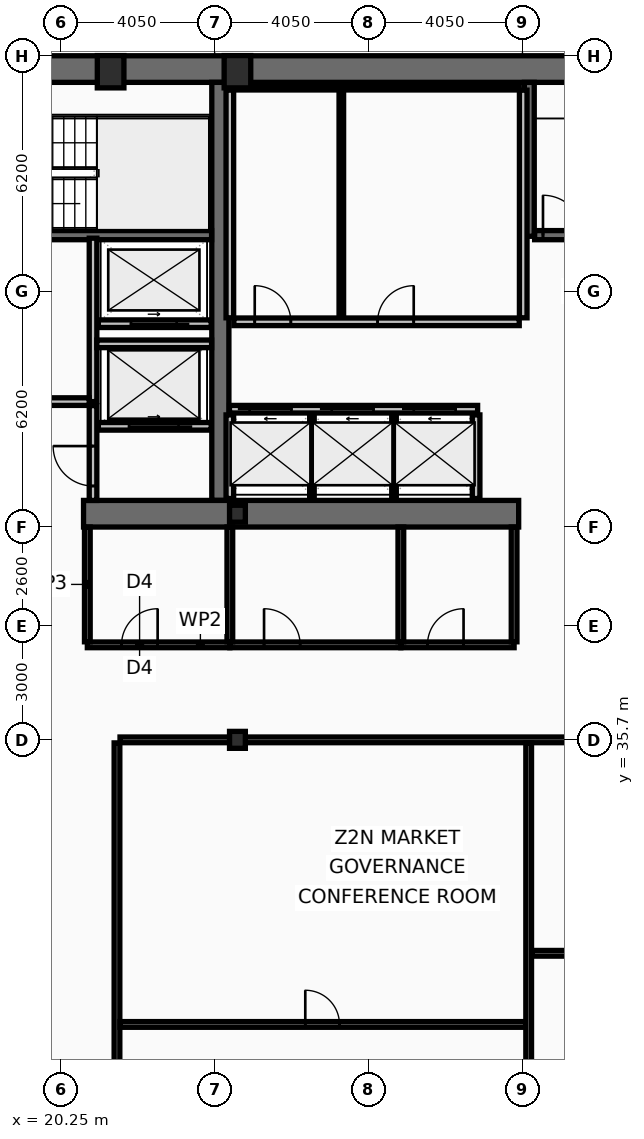
"""IFC4 building model, lengths in metres.
Left out: names, types, materials, properties, quantities, classifications, styles, units other than length and angle.
Written with IfcOpenShell. Run it as: python <this file> out.ifc"""

import sys

from ifc_helpers import new_model, si_unit, direction, frame, frame_2d, origin, origin_2d, place, context, subcontext, project, spatial, rectangle, hollow_rectangle, i_section, extrude, element, fill, save


model = new_model("IFC4")
c1 = context("Model", 3, precision=1e-05, world=origin(), true_north=direction((0.0, 1.0)))
c2 = subcontext(c1, "Body", "Model", "MODEL_VIEW")
j1 = project(units=[si_unit("LENGTHUNIT", "METRE"), si_unit("PLANEANGLEUNIT", "RADIAN")], contexts=[c1])
p1 = place(None, origin())
s1 = spatial("IfcSite", under=j1, at=p1, CompositionType="ELEMENT")
p2 = place(p1, origin())
s2 = spatial("IfcBuilding", under=s1, at=p2, CompositionType="ELEMENT")
p3 = place(p2, frame((0.0, 0.0, 161.4)))
s3 = spatial("IfcBuildingStorey", under=s2, at=p3, CompositionType="ELEMENT", Elevation=161.4)
p4 = place(p3, frame((16.2, 53.35, 0.0), z_axis=(0.0, 0.0, 1.0), x_axis=(1.0, 0.0, 0.0)))
e1 = element("IfcWall", 1, at=p4, inside=s3, PredefinedType="SHEAR", context=c2, shape_type="SweptSolid", body=[
    extrude(rectangle(XDim=40.5, YDim=0.7, at=frame_2d((20.25, 0.0))), origin(), (0.0, 0.0, 1.0), 3.44),
])
p5 = place(p3, frame((24.45, 42.0, 0.0), z_axis=(0.0, 0.0, 1.0), x_axis=(0.0, 1.0, 0.0)))
e2 = element("IfcWall", 2, at=p5, inside=s3, PredefinedType="SHEAR", context=c2, shape_type="SweptSolid", body=[
    extrude(rectangle(XDim=11.0, YDim=0.45, at=frame_2d((5.5, 0.0))), origin(), (0.0, 0.0, 1.0), 3.44),
])
p6 = place(p3, frame((32.3, 41.65, 0.0), z_axis=(0.0, 0.0, 1.0), x_axis=(-1.0, 0.0, 0.0)))
e3 = element("IfcWall", 3, at=p6, inside=s3, PredefinedType="SHEAR", context=c2, shape_type="SweptSolid", body=[
    extrude(rectangle(XDim=11.45, YDim=0.7, at=frame_2d((5.725, 0.0))), origin(), (0.0, 0.0, 1.0), 3.44),
])
p7 = place(p3, frame((32.58, 48.95, 0.0), z_axis=(0.0, 0.0, 1.0), x_axis=(0.0, 1.0, 0.0)))
e4 = element("IfcWall", 4, at=p7, inside=s3, PredefinedType="SHEAR", context=c2, shape_type="SweptSolid", body=[
    extrude(rectangle(XDim=4.05, YDim=0.26, at=frame_2d((2.025, 0.0))), origin(), (0.0, 0.0, 1.0), 3.44),
])
p8 = place(p3, frame((16.9, 48.98, 0.0), z_axis=(0.0, 0.0, 1.0), x_axis=(1.0, 0.0, 0.0)))
e5 = element("IfcWall", 5, at=p8, inside=s3, PredefinedType="SHEAR", context=c2, shape_type="SweptSolid", body=[
    extrude(rectangle(XDim=7.32, YDim=0.24, at=frame_2d((3.66, 0.0))), origin(), (0.0, 0.0, 1.0), 3.44),
])
p9 = place(p8, frame((0.22, 0.0, 0.0)))
e6 = element("IfcOpeningElement", 6, at=p9, cuts=e5, PredefinedType="OPENING", context=c2, shape_type="SweptSolid", body=[
    extrude(rectangle(XDim=1.05, YDim=2.15, at=frame_2d((0.525, 1.075))), frame((0.0, 0.13, 0.0), z_axis=(0.0, -1.0, 0.0), x_axis=(1.0, 0.0, 0.0)), (0.0, 0.0, 1.0), 0.26),
])
p10 = place(p3, frame((32.72, 48.98, 0.0), z_axis=(0.0, 0.0, 1.0), x_axis=(1.0, 0.0, 0.0)))
e7 = element("IfcWall", 7, at=p10, inside=s3, PredefinedType="SHEAR", context=c2, shape_type="SweptSolid", body=[
    extrude(rectangle(XDim=7.56, YDim=0.24, at=frame_2d((3.78, 0.0))), origin(), (0.0, 0.0, 1.0), 3.44),
])
p11 = place(p10, frame((0.22, 0.0, 0.0)))
e8 = element("IfcOpeningElement", 8, at=p11, cuts=e7, PredefinedType="OPENING", context=c2, shape_type="SweptSolid", body=[
    extrude(rectangle(XDim=1.05, YDim=2.15, at=frame_2d((0.525, 1.075))), frame((0.0, 0.13, 0.0), z_axis=(0.0, -1.0, 0.0), x_axis=(1.0, 0.0, 0.0)), (0.0, 0.0, 1.0), 0.26),
])
for number, where, z_axis, x_axis in (
    (9, (21.562, 53.28, 0.0), (0.0, 0.0, 1.0), (1.0, 0.0, 0.0)),
    (10, (24.9, 53.28, 0.0), (0.0, 0.0, 1.0), (1.0, 0.0, 0.0)),
):
    element("IfcColumn", number, at=place(p3, frame(where, z_axis=z_axis, x_axis=x_axis)), inside=s3, PredefinedType="COLUMN", context=c2, shape_type="SweptSolid", body=[
        extrude(hollow_rectangle(XDim=0.7, YDim=0.85, WallThickness=0.05, at=origin_2d()), origin(), (0.0, 0.0, 1.0), 3.6),
    ])
for number, where, z_axis, x_axis in (
    (11, (24.9, 35.7, 0.0), (0.0, 0.0, 1.0), (1.0, 0.0, 0.0)),
    (12, (24.9, 41.65, 0.0), (0.0, 0.0, 1.0), (1.0, 0.0, 0.0)),
):
    element("IfcColumn", number, at=place(p3, frame(where, z_axis=z_axis, x_axis=x_axis)), inside=s3, PredefinedType="COLUMN", context=c2, shape_type="SweptSolid", body=[
        extrude(i_section(OverallWidth=0.416, OverallDepth=0.446, WebThickness=0.039, FlangeThickness=0.063, at=origin_2d()), origin(), (0.0, 0.0, 1.0), 3.6),
    ])
p12 = place(p3, frame((24.69, 44.4, 0.0), z_axis=(0.0, 0.0, 1.0), x_axis=(1.0, 0.0, 0.0)))
e13 = element("IfcWall", 13, at=p12, inside=s3, PredefinedType="PARTITIONING", context=c2, shape_type="SweptSolid", body=[
    extrude(rectangle(XDim=6.53, YDim=0.2, at=frame_2d((3.265, 0.0))), origin(), (0.0, 0.0, 1.0), 3.44),
])
p13 = place(p12, frame((0.53, 0.0, 0.0)))
e14 = element("IfcOpeningElement", 14, at=p13, cuts=e13, PredefinedType="OPENING", context=c2, shape_type="SweptSolid", body=[
    extrude(rectangle(XDim=1.1, YDim=2.18, at=frame_2d((0.55, 1.09))), frame((0.0, 0.11, 0.0), z_axis=(0.0, -1.0, 0.0), x_axis=(1.0, 0.0, 0.0)), (0.0, 0.0, 1.0), 0.22),
])
p14 = place(p12, frame((2.69, 0.0, 0.0)))
e15 = element("IfcOpeningElement", 15, at=p14, cuts=e13, PredefinedType="OPENING", context=c2, shape_type="SweptSolid", body=[
    extrude(rectangle(XDim=1.1, YDim=2.18, at=frame_2d((0.55, 1.09))), frame((0.0, 0.11, 0.0), z_axis=(0.0, -1.0, 0.0), x_axis=(1.0, 0.0, 0.0)), (0.0, 0.0, 1.0), 0.22),
])
p15 = place(p12, frame((4.85, 0.0, 0.0)))
e16 = element("IfcOpeningElement", 16, at=p15, cuts=e13, PredefinedType="OPENING", context=c2, shape_type="SweptSolid", body=[
    extrude(rectangle(XDim=1.1, YDim=2.18, at=frame_2d((0.55, 1.09))), frame((0.0, 0.11, 0.0), z_axis=(0.0, -1.0, 0.0), x_axis=(1.0, 0.0, 0.0)), (0.0, 0.0, 1.0), 0.22),
])
p16 = place(p3, frame((24.21, 43.95, 0.0), z_axis=(0.0, 0.0, 1.0), x_axis=(-1.0, 0.0, 0.0)))
e17 = element("IfcWall", 17, at=p16, inside=s3, PredefinedType="PARTITIONING", context=c2, shape_type="SweptSolid", body=[
    extrude(rectangle(XDim=2.97, YDim=0.2, at=frame_2d((1.485, 0.0))), origin(), (0.0, 0.0, 1.0), 3.44),
])
p17 = place(p16, frame((0.86, 0.0, 0.0)))
e18 = element("IfcOpeningElement", 18, at=p17, cuts=e17, PredefinedType="OPENING", context=c2, shape_type="SweptSolid", body=[
    extrude(rectangle(XDim=1.3, YDim=2.18, at=frame_2d((0.65, 1.09))), frame((0.0, 0.11, 0.0), z_axis=(0.0, -1.0, 0.0), x_axis=(1.0, 0.0, 0.0)), (0.0, 0.0, 1.0), 0.22),
])
p18 = place(p3, frame((24.21, 46.65, 0.0), z_axis=(0.0, 0.0, 1.0), x_axis=(-1.0, 0.0, 0.0)))
e19 = element("IfcWall", 19, at=p18, inside=s3, PredefinedType="PARTITIONING", context=c2, shape_type="SweptSolid", body=[
    extrude(rectangle(XDim=2.97, YDim=0.2, at=frame_2d((1.485, 0.0))), origin(), (0.0, 0.0, 1.0), 3.44),
])
p19 = place(p18, frame((0.91, 0.0, 0.0)))
e20 = element("IfcOpeningElement", 20, at=p19, cuts=e19, PredefinedType="OPENING", context=c2, shape_type="SweptSolid", body=[
    extrude(rectangle(XDim=1.2, YDim=2.18, at=frame_2d((0.6, 1.09))), frame((0.0, 0.11, 0.0), z_axis=(0.0, -1.0, 0.0), x_axis=(1.0, 0.0, 0.0)), (0.0, 0.0, 1.0), 0.22),
])
p20 = place(p3, frame((21.1, 44.6, 0.0), z_axis=(0.0, 0.0, 1.0), x_axis=(0.0, 1.0, 0.0)))
e21 = element("IfcWall", 21, at=p20, inside=s3, PredefinedType="PARTITIONING", context=c2, shape_type="SweptSolid", body=[
    extrude(rectangle(XDim=4.3, YDim=0.2, at=frame_2d((2.15, 0.0))), origin(), (0.0, 0.0, 1.0), 3.44),
])
p21 = place(p3, frame((16.9, 44.6, 0.0), z_axis=(0.0, 0.0, 1.0), x_axis=(1.0, 0.0, 0.0)))
e22 = element("IfcWall", 22, at=p21, inside=s3, PredefinedType="PARTITIONING", context=c2, shape_type="SweptSolid", body=[
    extrude(rectangle(XDim=4.1, YDim=0.2, at=frame_2d((2.05, 0.0))), origin(), (0.0, 0.0, 1.0), 3.44),
])
p22 = place(p21, frame((1.25, 0.0, 0.0)))
e23 = element("IfcOpeningElement", 23, at=p22, cuts=e22, PredefinedType="OPENING", context=c2, shape_type="SweptSolid", body=[
    extrude(rectangle(XDim=1.05, YDim=2.15, at=frame_2d((0.525, 1.075))), frame((0.0, 0.11, 0.0), z_axis=(0.0, -1.0, 0.0), x_axis=(1.0, 0.0, 0.0)), (0.0, 0.0, 1.0), 0.22),
])
p23 = place(p3, frame((21.2, 46.12, 0.0), z_axis=(0.0, 0.0, 1.0), x_axis=(1.0, 0.0, 0.0)))
e24 = element("IfcWall", 24, at=p23, inside=s3, PredefinedType="PARTITIONING", context=c2, shape_type="SweptSolid", body=[
    extrude(rectangle(XDim=3.02, YDim=0.2, at=frame_2d((1.51, 0.0))), origin(), (0.0, 0.0, 1.0), 3.44),
])
p24 = place(p3, frame((21.1, 42.0, 0.0), z_axis=(0.0, 0.0, 1.0), x_axis=(0.0, 1.0, 0.0)))
e25 = element("IfcWall", 25, at=p24, inside=s3, PredefinedType="PARTITIONING", context=c2, shape_type="SweptSolid", body=[
    extrude(rectangle(XDim=2.495, YDim=0.2, at=frame_2d((1.248, 0.0))), origin(), (0.0, 0.0, 1.0), 3.44),
])
p25 = place(p24, frame((0.38, 0.0, 0.0)))
e26 = element("IfcOpeningElement", 26, at=p25, cuts=e25, PredefinedType="OPENING", context=c2, shape_type="SweptSolid", body=[
    extrude(rectangle(XDim=1.05, YDim=2.15, at=frame_2d((0.525, 1.075))), frame((0.0, 0.11, 0.0), z_axis=(0.0, -1.0, 0.0), x_axis=(1.0, 0.0, 0.0)), (0.0, 0.0, 1.0), 0.22),
])
for number, where, z_axis, x_axis in (
    (27, (24.7, 46.805, 0.0), (0.0, 0.0, 1.0), (0.0, 1.0, 0.0)),
    (28, (32.42, 46.805, 0.0), (0.0, 0.0, 1.0), (0.0, 1.0, 0.0)),
):
    element("IfcWall", number, at=place(p3, frame(where, z_axis=z_axis, x_axis=x_axis)), inside=s3, PredefinedType="PARTITIONING", context=c2, shape_type="SweptSolid", body=[
        extrude(rectangle(XDim=5.99, YDim=0.2, at=frame_2d((2.995, 0.0))), origin(), (0.0, 0.0, 1.0), 3.44),
    ])
p26 = place(p3, frame((24.805, 52.86, 0.0), z_axis=(0.0, 0.0, 1.0), x_axis=(1.0, 0.0, 0.0)))
e29 = element("IfcWall", 29, at=p26, inside=s3, PredefinedType="PARTITIONING", context=c2, shape_type="SweptSolid", body=[
    extrude(rectangle(XDim=7.51, YDim=0.12, at=frame_2d((3.755, 0.0))), origin(), (0.0, 0.0, 1.0), 3.44),
])
p27 = place(p3, frame((27.634, 46.805, 0.0), z_axis=(0.0, 0.0, 1.0), x_axis=(0.0, 1.0, 0.0)))
e30 = element("IfcWall", 30, at=p27, inside=s3, PredefinedType="PARTITIONING", context=c2, shape_type="SweptSolid", body=[
    extrude(rectangle(XDim=5.99, YDim=0.12, at=frame_2d((2.995, 0.0))), origin(), (0.0, 0.0, 1.0), 3.44),
])
p28 = place(p3, frame((24.805, 46.7, 0.0), z_axis=(0.0, 0.0, 1.0), x_axis=(1.0, 0.0, 0.0)))
e31 = element("IfcWall", 31, at=p28, inside=s3, PredefinedType="PARTITIONING", context=c2, shape_type="SweptSolid", body=[
    extrude(rectangle(XDim=7.51, YDim=0.2, at=frame_2d((3.755, 0.0))), origin(), (0.0, 0.0, 1.0), 3.44),
])
p29 = place(p28, frame((0.55, 0.0, 0.0)))
e32 = element("IfcOpeningElement", 32, at=p29, cuts=e31, PredefinedType="OPENING", context=c2, shape_type="SweptSolid", body=[
    extrude(rectangle(XDim=0.95, YDim=2.1, at=frame_2d((0.475, 1.05))), frame((0.0, 0.11, 0.0), z_axis=(0.0, -1.0, 0.0), x_axis=(1.0, 0.0, 0.0)), (0.0, 0.0, 1.0), 0.22),
])
p30 = place(p28, frame((3.784, 0.0, 0.0)))
e33 = element("IfcOpeningElement", 33, at=p30, cuts=e31, PredefinedType="OPENING", context=c2, shape_type="SweptSolid", body=[
    extrude(rectangle(XDim=0.95, YDim=2.1, at=frame_2d((0.475, 1.05))), frame((0.0, 0.11, 0.0), z_axis=(0.0, -1.0, 0.0), x_axis=(1.0, 0.0, 0.0)), (0.0, 0.0, 1.0), 0.22),
])
for number, where, z_axis, x_axis in (
    (34, (24.7, 42.05, 0.0), (0.0, 0.0, 1.0), (0.0, 1.0, 0.0)),
    (35, (31.18, 42.05, 0.0), (0.0, 0.0, 1.0), (0.0, 1.0, 0.0)),
):
    element("IfcWall", number, at=place(p3, frame(where, z_axis=z_axis, x_axis=x_axis)), inside=s3, PredefinedType="PARTITIONING", context=c2, shape_type="SweptSolid", body=[
        extrude(rectangle(XDim=2.2, YDim=0.2, at=frame_2d((1.1, 0.0))), origin(), (0.0, 0.0, 1.0), 3.44),
    ])
for number, where, z_axis, x_axis in (
    (36, (26.86, 42.05, 0.0), (0.0, 0.0, 1.0), (0.0, 1.0, 0.0)),
    (37, (29.02, 42.05, 0.0), (0.0, 0.0, 1.0), (0.0, 1.0, 0.0)),
):
    element("IfcWall", number, at=place(p3, frame(where, z_axis=z_axis, x_axis=x_axis)), inside=s3, PredefinedType="PARTITIONING", context=c2, shape_type="SweptSolid", body=[
        extrude(rectangle(XDim=2.2, YDim=0.12, at=frame_2d((1.1, 0.0))), origin(), (0.0, 0.0, 1.0), 3.44),
    ])
p31 = place(p3, frame((20.95, 38.2, 0.0), z_axis=(0.0, 0.0, 1.0), x_axis=(1.0, 0.0, 0.0)))
e38 = element("IfcWall", 38, at=p31, inside=s3, PredefinedType="PARTITIONING", context=c2, shape_type="SweptSolid", body=[
    extrude(rectangle(XDim=3.75, YDim=0.15, at=frame_2d((1.875, 0.0))), origin(), (0.0, 0.0, 1.0), 2.73),
])
p32 = place(p31, frame((0.9, 0.0, 0.0)))
e39 = element("IfcOpeningElement", 39, at=p32, cuts=e38, PredefinedType="OPENING", context=c2, shape_type="SweptSolid", body=[
    extrude(rectangle(XDim=0.95, YDim=2.05, at=frame_2d((0.475, 1.025))), frame((0.0, 0.085, 0.0), z_axis=(0.0, -1.0, 0.0), x_axis=(1.0, 0.0, 0.0)), (0.0, 0.0, 1.0), 0.17),
])
p33 = place(p3, frame((24.7, 38.2, 0.0), z_axis=(0.0, 0.0, 1.0), x_axis=(1.0, 0.0, 0.0)))
e40 = element("IfcWall", 40, at=p33, inside=s3, PredefinedType="PARTITIONING", context=c2, shape_type="SweptSolid", body=[
    extrude(rectangle(XDim=4.5, YDim=0.15, at=frame_2d((2.25, 0.0))), origin(), (0.0, 0.0, 1.0), 2.73),
])
p34 = place(p33, frame((0.9, 0.0, 0.0)))
e41 = element("IfcOpeningElement", 41, at=p34, cuts=e40, PredefinedType="OPENING", context=c2, shape_type="SweptSolid", body=[
    extrude(rectangle(XDim=0.95, YDim=2.05, at=frame_2d((0.475, 1.025))), frame((0.0, 0.085, 0.0), z_axis=(0.0, -1.0, 0.0), x_axis=(1.0, 0.0, 0.0)), (0.0, 0.0, 1.0), 0.17),
])
p35 = place(p3, frame((29.2, 38.2, 0.0), z_axis=(0.0, 0.0, 1.0), x_axis=(1.0, 0.0, 0.0)))
e42 = element("IfcWall", 42, at=p35, inside=s3, PredefinedType="PARTITIONING", context=c2, shape_type="SweptSolid", body=[
    extrude(rectangle(XDim=2.98, YDim=0.15, at=frame_2d((1.49, 0.0))), origin(), (0.0, 0.0, 1.0), 2.73),
])
p36 = place(p35, frame((0.7, 0.0, 0.0)))
e43 = element("IfcOpeningElement", 43, at=p36, cuts=e42, PredefinedType="OPENING", context=c2, shape_type="SweptSolid", body=[
    extrude(rectangle(XDim=0.95, YDim=2.05, at=frame_2d((0.475, 1.025))), frame((0.0, 0.085, 0.0), z_axis=(0.0, -1.0, 0.0), x_axis=(1.0, 0.0, 0.0)), (0.0, 0.0, 1.0), 0.17),
])
p37 = place(p3, frame((20.95, 38.28, 0.0), z_axis=(0.0, 0.0, 1.0), x_axis=(0.0, 1.0, 0.0)))
e44 = element("IfcWall", 44, at=p37, inside=s3, PredefinedType="PARTITIONING", context=c2, shape_type="SweptSolid", body=[
    extrude(rectangle(XDim=3.02, YDim=0.15, at=frame_2d((1.51, 0.0))), origin(), (0.0, 0.0, 1.0), 3.44),
])
p38 = place(p3, frame((24.7, 38.28, 0.0), z_axis=(0.0, 0.0, 1.0), x_axis=(0.0, 1.0, 0.0)))
e45 = element("IfcWall", 45, at=p38, inside=s3, PredefinedType="PARTITIONING", context=c2, shape_type="SweptSolid", body=[
    extrude(rectangle(XDim=3.02, YDim=0.15, at=frame_2d((1.51, 0.0))), origin(), (0.0, 0.0, 1.0), 2.73),
])
for number, where, z_axis, x_axis in (
    (46, (29.2, 38.28, 0.0), (0.0, 0.0, 1.0), (0.0, 1.0, 0.0)),
    (47, (32.18, 38.28, 0.0), (0.0, 0.0, 1.0), (0.0, 1.0, 0.0)),
):
    element("IfcWall", number, at=place(p3, frame(where, z_axis=z_axis, x_axis=x_axis)), inside=s3, PredefinedType="PARTITIONING", context=c2, shape_type="SweptSolid", body=[
        extrude(rectangle(XDim=3.02, YDim=0.15, at=frame_2d((1.51, 0.0))), origin(), (0.0, 0.0, 1.0), 3.44),
    ])
p39 = place(p3, frame((21.73, 24.085, 0.0), z_axis=(0.0, 0.0, 1.0), x_axis=(0.0, 1.0, 0.0)))
e48 = element("IfcWall", 48, at=p39, inside=s3, PredefinedType="PARTITIONING", context=c2, shape_type="SweptSolid", body=[
    extrude(rectangle(XDim=11.535, YDim=0.15, at=frame_2d((5.768, 0.0))), origin(), (0.0, 0.0, 1.0), 2.93),
])
p40 = place(p3, frame((21.81, 35.7, 0.0), z_axis=(0.0, 0.0, 1.0), x_axis=(1.0, 0.0, 0.0)))
e49 = element("IfcWall", 49, at=p40, inside=s3, PredefinedType="PARTITIONING", context=c2, shape_type="SweptSolid", body=[
    extrude(rectangle(XDim=44.995, YDim=0.15, at=frame_2d((22.498, 0.0))), origin(), (0.0, 0.0, 1.0), 2.73),
])
p41 = place(p3, frame((21.81, 28.212, 0.0), z_axis=(0.0, 0.0, 1.0), x_axis=(1.0, 0.0, 0.0)))
e50 = element("IfcWall", 50, at=p41, inside=s3, PredefinedType="PARTITIONING", context=c2, shape_type="SweptSolid", body=[
    extrude(rectangle(XDim=10.674, YDim=0.15, at=frame_2d((5.337, 0.0))), origin(), (0.0, 0.0, 1.0), 2.73),
])
p42 = place(p41, frame((4.875, 0.0, 0.0)))
e51 = element("IfcOpeningElement", 51, at=p42, cuts=e50, PredefinedType="OPENING", context=c2, shape_type="SweptSolid", body=[
    extrude(rectangle(XDim=0.9, YDim=2.05, at=frame_2d((0.45, 1.025))), frame((0.0, 0.085, 0.0), z_axis=(0.0, -1.0, 0.0), x_axis=(1.0, 0.0, 0.0)), (0.0, 0.0, 1.0), 0.17),
])
p43 = place(p3, frame((32.564, 24.085, 0.0), z_axis=(0.0, 0.0, 1.0), x_axis=(0.0, 1.0, 0.0)))
e52 = element("IfcWall", 52, at=p43, inside=s3, PredefinedType="PARTITIONING", context=c2, shape_type="SweptSolid", body=[
    extrude(rectangle(XDim=11.535, YDim=0.15, at=frame_2d((5.768, 0.0))), origin(), (0.0, 0.0, 1.0), 2.93),
])
p44 = place(p3, frame((32.644, 30.084, 0.0), z_axis=(0.0, 0.0, 1.0), x_axis=(1.0, 0.0, 0.0)))
e53 = element("IfcWall", 53, at=p44, inside=s3, PredefinedType="PARTITIONING", context=c2, shape_type="SweptSolid", body=[
    extrude(rectangle(XDim=7.514, YDim=0.15, at=frame_2d((3.757, 0.0))), origin(), (0.0, 0.0, 1.0), 3.44),
])
p45 = place(p44, frame((3.453, 0.0, 0.0)))
e54 = element("IfcOpeningElement", 54, at=p45, cuts=e53, PredefinedType="OPENING", context=c2, shape_type="SweptSolid", body=[
    extrude(rectangle(XDim=0.9, YDim=2.05, at=frame_2d((0.45, 1.025))), frame((0.0, 0.085, 0.0), z_axis=(0.0, -1.0, 0.0), x_axis=(1.0, 0.0, 0.0)), (0.0, 0.0, 1.0), 0.17),
])
p46 = place(p11, origin())
e55 = element("IfcDoor", 55, at=p46, inside=s3, OperationType="SINGLE_SWING_LEFT", PredefinedType="DOOR", context=c2, shape_type="SweptSolid", body=[
    extrude(rectangle(XDim=1.05, YDim=2.15, at=frame_2d((0.525, 1.075))), frame((0.0, 0.025, 0.0), z_axis=(0.0, -1.0, 0.0), x_axis=(1.0, 0.0, 0.0)), (0.0, 0.0, 1.0), 0.05),
])
fill(e8, e55)
p47 = place(p13, origin())
e56 = element("IfcDoor", 56, at=p47, inside=s3, OperationType="SLIDING_TO_LEFT", PredefinedType="DOOR", context=c2, shape_type="SweptSolid", body=[
    extrude(rectangle(XDim=1.1, YDim=2.18, at=frame_2d((0.55, 1.09))), frame((0.0, 0.025, 0.0), z_axis=(0.0, -1.0, 0.0), x_axis=(1.0, 0.0, 0.0)), (0.0, 0.0, 1.0), 0.05),
])
fill(e14, e56)
p48 = place(p14, origin())
e57 = element("IfcDoor", 57, at=p48, inside=s3, OperationType="SLIDING_TO_LEFT", PredefinedType="DOOR", context=c2, shape_type="SweptSolid", body=[
    extrude(rectangle(XDim=1.1, YDim=2.18, at=frame_2d((0.55, 1.09))), frame((0.0, 0.025, 0.0), z_axis=(0.0, -1.0, 0.0), x_axis=(1.0, 0.0, 0.0)), (0.0, 0.0, 1.0), 0.05),
])
fill(e15, e57)
p49 = place(p15, origin())
e58 = element("IfcDoor", 58, at=p49, inside=s3, OperationType="SLIDING_TO_LEFT", PredefinedType="DOOR", context=c2, shape_type="SweptSolid", body=[
    extrude(rectangle(XDim=1.1, YDim=2.18, at=frame_2d((0.55, 1.09))), frame((0.0, 0.025, 0.0), z_axis=(0.0, -1.0, 0.0), x_axis=(1.0, 0.0, 0.0)), (0.0, 0.0, 1.0), 0.05),
])
fill(e16, e58)
p50 = place(p17, origin())
e59 = element("IfcDoor", 59, at=p50, inside=s3, OperationType="SLIDING_TO_LEFT", PredefinedType="DOOR", context=c2, shape_type="SweptSolid", body=[
    extrude(rectangle(XDim=1.3, YDim=2.18, at=frame_2d((0.65, 1.09))), frame((0.0, 0.025, 0.0), z_axis=(0.0, -1.0, 0.0), x_axis=(1.0, 0.0, 0.0)), (0.0, 0.0, 1.0), 0.05),
])
fill(e18, e59)
p51 = place(p19, origin())
e60 = element("IfcDoor", 60, at=p51, inside=s3, OperationType="SLIDING_TO_LEFT", PredefinedType="DOOR", context=c2, shape_type="SweptSolid", body=[
    extrude(rectangle(XDim=1.2, YDim=2.18, at=frame_2d((0.6, 1.09))), frame((0.0, 0.025, 0.0), z_axis=(0.0, -1.0, 0.0), x_axis=(1.0, 0.0, 0.0)), (0.0, 0.0, 1.0), 0.05),
])
fill(e20, e60)
p52 = place(p25, origin())
e61 = element("IfcDoor", 61, at=p52, inside=s3, OperationType="SINGLE_SWING_RIGHT", PredefinedType="DOOR", context=c2, shape_type="SweptSolid", body=[
    extrude(rectangle(XDim=1.05, YDim=2.15, at=frame_2d((0.525, 1.075))), frame((0.0, 0.025, 0.0), z_axis=(0.0, -1.0, 0.0), x_axis=(1.0, 0.0, 0.0)), (0.0, 0.0, 1.0), 0.05),
])
fill(e26, e61)
p53 = place(p29, origin())
e62 = element("IfcDoor", 62, at=p53, inside=s3, OperationType="SINGLE_SWING_LEFT", PredefinedType="DOOR", context=c2, shape_type="SweptSolid", body=[
    extrude(rectangle(XDim=0.95, YDim=2.1, at=frame_2d((0.475, 1.05))), frame((0.0, 0.025, 0.0), z_axis=(0.0, -1.0, 0.0), x_axis=(1.0, 0.0, 0.0)), (0.0, 0.0, 1.0), 0.05),
])
fill(e32, e62)
p54 = place(p30, origin())
e63 = element("IfcDoor", 63, at=p54, inside=s3, OperationType="SINGLE_SWING_RIGHT", PredefinedType="DOOR", context=c2, shape_type="SweptSolid", body=[
    extrude(rectangle(XDim=0.95, YDim=2.1, at=frame_2d((0.475, 1.05))), frame((0.0, 0.025, 0.0), z_axis=(0.0, -1.0, 0.0), x_axis=(1.0, 0.0, 0.0)), (0.0, 0.0, 1.0), 0.05),
])
fill(e33, e63)
p55 = place(p32, origin())
e64 = element("IfcDoor", 64, at=p55, inside=s3, OperationType="SINGLE_SWING_RIGHT", PredefinedType="DOOR", context=c2, shape_type="SweptSolid", body=[
    extrude(rectangle(XDim=0.95, YDim=2.05, at=frame_2d((0.475, 1.025))), frame((0.0, 0.025, 0.0), z_axis=(0.0, -1.0, 0.0), x_axis=(1.0, 0.0, 0.0)), (0.0, 0.0, 1.0), 0.05),
])
fill(e39, e64)
p56 = place(p34, origin())
e65 = element("IfcDoor", 65, at=p56, inside=s3, OperationType="SINGLE_SWING_LEFT", PredefinedType="DOOR", context=c2, shape_type="SweptSolid", body=[
    extrude(rectangle(XDim=0.95, YDim=2.05, at=frame_2d((0.475, 1.025))), frame((0.0, 0.025, 0.0), z_axis=(0.0, -1.0, 0.0), x_axis=(1.0, 0.0, 0.0)), (0.0, 0.0, 1.0), 0.05),
])
fill(e41, e65)
p57 = place(p36, origin())
e66 = element("IfcDoor", 66, at=p57, inside=s3, OperationType="SINGLE_SWING_RIGHT", PredefinedType="DOOR", context=c2, shape_type="SweptSolid", body=[
    extrude(rectangle(XDim=0.95, YDim=2.05, at=frame_2d((0.475, 1.025))), frame((0.0, 0.025, 0.0), z_axis=(0.0, -1.0, 0.0), x_axis=(1.0, 0.0, 0.0)), (0.0, 0.0, 1.0), 0.05),
])
fill(e43, e66)
p58 = place(p42, origin())
e67 = element("IfcDoor", 67, at=p58, inside=s3, OperationType="SINGLE_SWING_LEFT", PredefinedType="DOOR", context=c2, shape_type="SweptSolid", body=[
    extrude(rectangle(XDim=0.9, YDim=2.05, at=frame_2d((0.45, 1.025))), frame((0.0, 0.025, 0.0), z_axis=(0.0, -1.0, 0.0), x_axis=(1.0, 0.0, 0.0)), (0.0, 0.0, 1.0), 0.05),
])
fill(e51, e67)
save(model, sys.argv[1])
